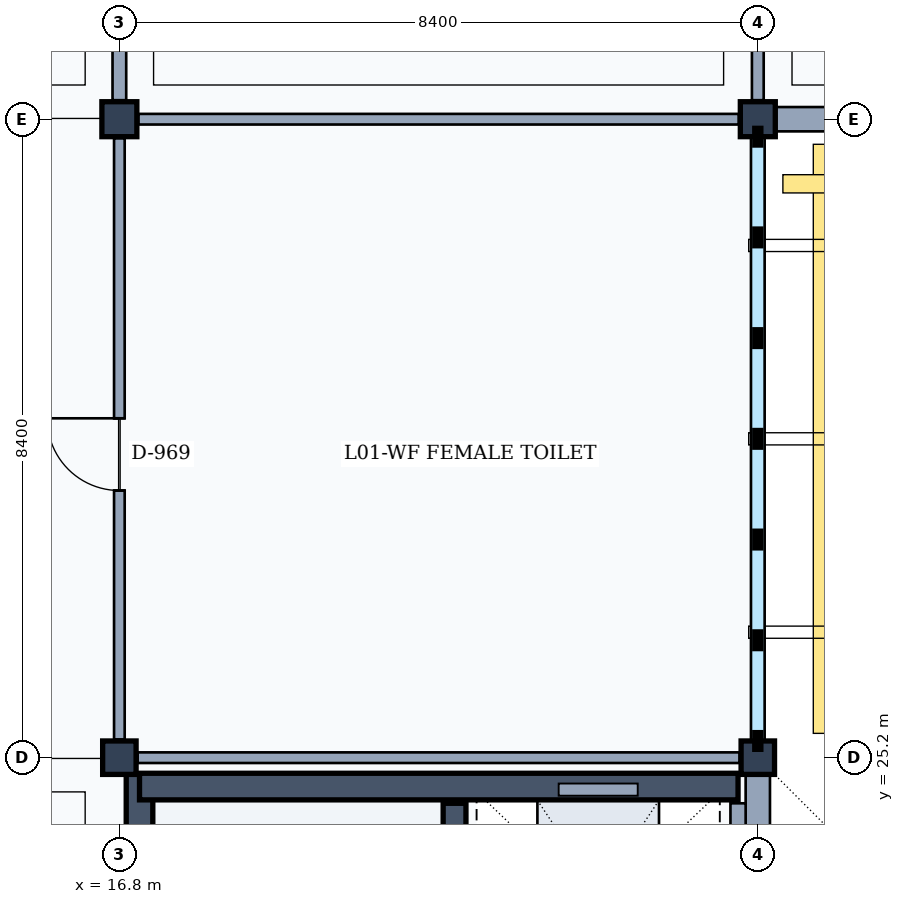
"""IFC4 building model, lengths in metres.
Left out: names, types, materials, properties, quantities, classifications, styles, units other than length and angle.
Written with IfcOpenShell. Run it as: python <this file> out.ifc"""

import sys

from ifc_helpers import new_model, si_unit, direction, frame, frame_2d, origin, origin_2d, place, context, subcontext, project, spatial, rectangle, extrude, element, fill, save


model = new_model("IFC4")
c1 = context("Model", 3, precision=1e-05, world=origin(), true_north=direction((0.0, 1.0)))
c2 = subcontext(c1, "Body", "Model", "MODEL_VIEW")
j1 = project(units=[si_unit("LENGTHUNIT", "METRE"), si_unit("PLANEANGLEUNIT", "RADIAN")], contexts=[c1])
p1 = place(None, origin())
s1 = spatial("IfcSite", under=j1, at=p1, CompositionType="ELEMENT")
p2 = place(p1, origin())
s2 = spatial("IfcBuilding", under=s1, at=p2, CompositionType="ELEMENT")
p3 = place(p2, frame((0.0, 0.0, 4.8)))
s3 = spatial("IfcBuildingStorey", under=s2, at=p3, CompositionType="ELEMENT", Elevation=4.8)
p4 = place(p3, frame((16.8, 25.2, 0.0), z_axis=(0.0, 0.0, 1.0), x_axis=(1.0, 0.0, 0.0)))
e1 = element("IfcColumn", 1, at=p4, inside=s3, PredefinedType="COLUMN", context=c2, shape_type="SweptSolid", body=[
    extrude(rectangle(XDim=0.44, YDim=0.44, at=origin_2d()), origin(), (0.0, 0.0, 1.0), 4.8),
])
p5 = place(p3, frame((16.8, 33.6, 0.0), z_axis=(0.0, 0.0, 1.0), x_axis=(1.0, 0.0, 0.0)))
e2 = element("IfcColumn", 2, at=p5, inside=s3, PredefinedType="COLUMN", context=c2, shape_type="SweptSolid", body=[
    extrude(rectangle(XDim=0.46, YDim=0.46, at=origin_2d()), origin(), (0.0, 0.0, 1.0), 4.8),
])
p6 = place(p3, frame((25.2, 25.2, 0.0), z_axis=(0.0, 0.0, 1.0), x_axis=(1.0, 0.0, 0.0)))
e3 = element("IfcColumn", 3, at=p6, inside=s3, PredefinedType="COLUMN", context=c2, shape_type="SweptSolid", body=[
    extrude(rectangle(XDim=0.44, YDim=0.44, at=origin_2d()), origin(), (0.0, 0.0, 1.0), 4.8),
])
p7 = place(p3, frame((25.2, 33.6, 0.0), z_axis=(0.0, 0.0, 1.0), x_axis=(1.0, 0.0, 0.0)))
e4 = element("IfcColumn", 4, at=p7, inside=s3, PredefinedType="COLUMN", context=c2, shape_type="SweptSolid", body=[
    extrude(rectangle(XDim=0.46, YDim=0.46, at=origin_2d()), origin(), (0.0, 0.0, 1.0), 4.8),
])
p8 = place(p3, frame((25.2, 24.98, 0.0), z_axis=(0.0, 0.0, 1.0), x_axis=(0.0, -1.0, 0.0)))
e5 = element("IfcWall", 5, at=p8, inside=s3, PredefinedType="SOLIDWALL", context=c2, shape_type="SweptSolid", body=[
    extrude(rectangle(XDim=7.95, YDim=0.32, at=frame_2d((3.975, 0.0))), origin(), (0.0, 0.0, 1.0), 3.96),
])
p9 = place(p3, frame((33.6, 33.6, 0.0), z_axis=(0.0, 0.0, 1.0), x_axis=(-1.0, 0.0, 0.0)))
e6 = element("IfcWall", 6, at=p9, inside=s3, PredefinedType="SOLIDWALL", context=c2, shape_type="SweptSolid", body=[
    extrude(rectangle(XDim=8.17, YDim=0.32, at=frame_2d((4.085, 0.0))), origin(), (0.0, 0.0, 1.0), 2.95),
])
p10 = place(p9, frame((3.585, 0.0, 0.9)))
e7 = element("IfcOpeningElement", 7, at=p10, cuts=e6, PredefinedType="OPENING", context=c2, shape_type="SweptSolid", body=[
    extrude(rectangle(XDim=1.0, YDim=1.4, at=frame_2d((0.5, 0.7))), frame((0.0, 0.17, 0.0), z_axis=(0.0, -1.0, 0.0), x_axis=(1.0, 0.0, 0.0)), (0.0, 0.0, 1.0), 0.34),
])
p11 = place(p3, frame((17.065, 17.05, 0.0), z_axis=(0.0, 0.0, 1.0), x_axis=(0.0, 1.0, 0.0)))
e8 = element("IfcWall", 8, at=p11, inside=s3, PredefinedType="SHEAR", context=c2, shape_type="SweptSolid", body=[
    extrude(rectangle(XDim=7.94, YDim=0.35, at=frame_2d((3.97, 0.0))), origin(), (0.0, 0.0, 1.0), 4.56),
])
p12 = place(p3, frame((17.065, 24.82, 0.0), z_axis=(0.0, 0.0, 1.0), x_axis=(1.0, 0.0, 0.0)))
e9 = element("IfcWall", 9, at=p12, inside=s3, PredefinedType="SHEAR", context=c2, shape_type="SweptSolid", body=[
    extrude(rectangle(XDim=7.875, YDim=0.35, at=frame_2d((3.938, 0.0))), origin(), (0.0, 0.0, 1.0), 4.56),
])
p13 = place(p3, frame((24.94, 24.6, 0.0), z_axis=(0.0, 0.0, 1.0), x_axis=(0.0, -1.0, 0.0)))
e10 = element("IfcWall", 10, at=p13, inside=s3, PredefinedType="PARTITIONING", context=c2, shape_type="SweptSolid", body=[
    extrude(rectangle(XDim=7.2, YDim=0.2, at=frame_2d((3.6, 0.0))), origin(), (0.0, 0.0, 1.0), 3.92),
])
p14 = place(p3, frame((21.21, 17.22, 0.0), z_axis=(0.0, 0.0, 1.0), x_axis=(0.0, 1.0, 0.0)))
e11 = element("IfcWall", 11, at=p14, inside=s3, PredefinedType="SHEAR", context=c2, shape_type="SweptSolid", body=[
    extrude(rectangle(XDim=7.38, YDim=0.3, at=frame_2d((3.69, 0.0))), origin(), (0.0, 0.0, 1.0), 4.56),
])
p15 = place(p14, frame((0.28, 0.0, 0.0)))
e12 = element("IfcOpeningElement", 12, at=p15, cuts=e11, PredefinedType="OPENING", context=c2, shape_type="SweptSolid", body=[
    extrude(rectangle(XDim=1.1, YDim=2.15, at=frame_2d((0.55, 1.075))), frame((0.0, 0.16, 0.0), z_axis=(0.0, -1.0, 0.0), x_axis=(1.0, 0.0, 0.0)), (0.0, 0.0, 1.0), 0.32),
])
p16 = place(p3, frame((16.8, 25.44, 0.0), z_axis=(0.0, 0.0, 1.0), x_axis=(0.0, 1.0, 0.0)))
e13 = element("IfcWall", 13, at=p16, inside=s3, PredefinedType="PARTITIONING", context=c2, shape_type="SweptSolid", body=[
    extrude(rectangle(XDim=7.91, YDim=0.14, at=frame_2d((3.955, 0.0))), origin(), (0.0, 0.0, 1.0), 3.92),
])
p17 = place(p16, frame((3.275, 0.0, 0.0)))
e14 = element("IfcOpeningElement", 14, at=p17, cuts=e13, PredefinedType="OPENING", context=c2, shape_type="SweptSolid", body=[
    extrude(rectangle(XDim=0.95, YDim=2.15, at=frame_2d((0.475, 1.075))), frame((0.0, 0.08, 0.0), z_axis=(0.0, -1.0, 0.0), x_axis=(1.0, 0.0, 0.0)), (0.0, 0.0, 1.0), 0.16),
])
p18 = place(p3, frame((16.8, 33.85, 0.0), z_axis=(0.0, 0.0, 1.0), x_axis=(0.0, 1.0, 0.0)))
e15 = element("IfcWall", 15, at=p18, inside=s3, PredefinedType="PARTITIONING", context=c2, shape_type="SweptSolid", body=[
    extrude(rectangle(XDim=7.92, YDim=0.18, at=frame_2d((3.96, 0.0))), origin(), (0.0, 0.0, 1.0), 3.92),
])
p19 = place(p18, frame((3.275, 0.0, 0.0)))
e16 = element("IfcOpeningElement", 16, at=p19, cuts=e15, PredefinedType="OPENING", context=c2, shape_type="SweptSolid", body=[
    extrude(rectangle(XDim=0.95, YDim=2.15, at=frame_2d((0.475, 1.075))), frame((0.0, 0.1, 0.0), z_axis=(0.0, -1.0, 0.0), x_axis=(1.0, 0.0, 0.0)), (0.0, 0.0, 1.0), 0.2),
])
p20 = place(p3, frame((17.04, 25.2, 0.0), z_axis=(0.0, 0.0, 1.0), x_axis=(1.0, 0.0, 0.0)))
e17 = element("IfcWall", 17, at=p20, inside=s3, PredefinedType="PARTITIONING", context=c2, shape_type="SweptSolid", body=[
    extrude(rectangle(XDim=7.92, YDim=0.14, at=frame_2d((3.96, 0.0))), origin(), (0.0, 0.0, 1.0), 3.92),
])
p21 = place(p3, frame((17.05, 33.6, 0.0), z_axis=(0.0, 0.0, 1.0), x_axis=(1.0, 0.0, 0.0)))
e18 = element("IfcWall", 18, at=p21, inside=s3, PredefinedType="PARTITIONING", context=c2, shape_type="SweptSolid", body=[
    extrude(rectangle(XDim=7.9, YDim=0.14, at=frame_2d((3.95, 0.0))), origin(), (0.0, 0.0, 1.0), 3.92),
])
p22 = place(p3, frame((25.2, 33.85, 0.0), z_axis=(0.0, 0.0, 1.0), x_axis=(0.0, 1.0, 0.0)))
e19 = element("IfcWall", 19, at=p22, inside=s3, PredefinedType="PARTITIONING", context=c2, shape_type="SweptSolid", body=[
    extrude(rectangle(XDim=7.92, YDim=0.155, at=frame_2d((3.96, 0.0))), origin(), (0.0, 0.0, 1.0), 3.92),
])
p23 = place(p22, frame((3.0, 0.0, 0.0)))
e20 = element("IfcOpeningElement", 20, at=p23, cuts=e19, PredefinedType="OPENING", context=c2, shape_type="SweptSolid", body=[
    extrude(rectangle(XDim=1.5, YDim=2.3, at=frame_2d((0.75, 1.15))), frame((0.0, 0.087, 0.0), z_axis=(0.0, -1.0, 0.0), x_axis=(1.0, 0.0, 0.0)), (0.0, 0.0, 1.0), 0.175),
])
p24 = place(p17, origin())
e21 = element("IfcDoor", 21, at=p24, inside=s3, OperationType="SINGLE_SWING_RIGHT", PredefinedType="DOOR", context=c2, shape_type="SweptSolid", body=[
    extrude(rectangle(XDim=0.95, YDim=2.15, at=frame_2d((0.475, 1.075))), frame((0.0, 0.025, 0.0), z_axis=(0.0, -1.0, 0.0), x_axis=(1.0, 0.0, 0.0)), (0.0, 0.0, 1.0), 0.05),
])
fill(e14, e21)
save(model, sys.argv[1])
